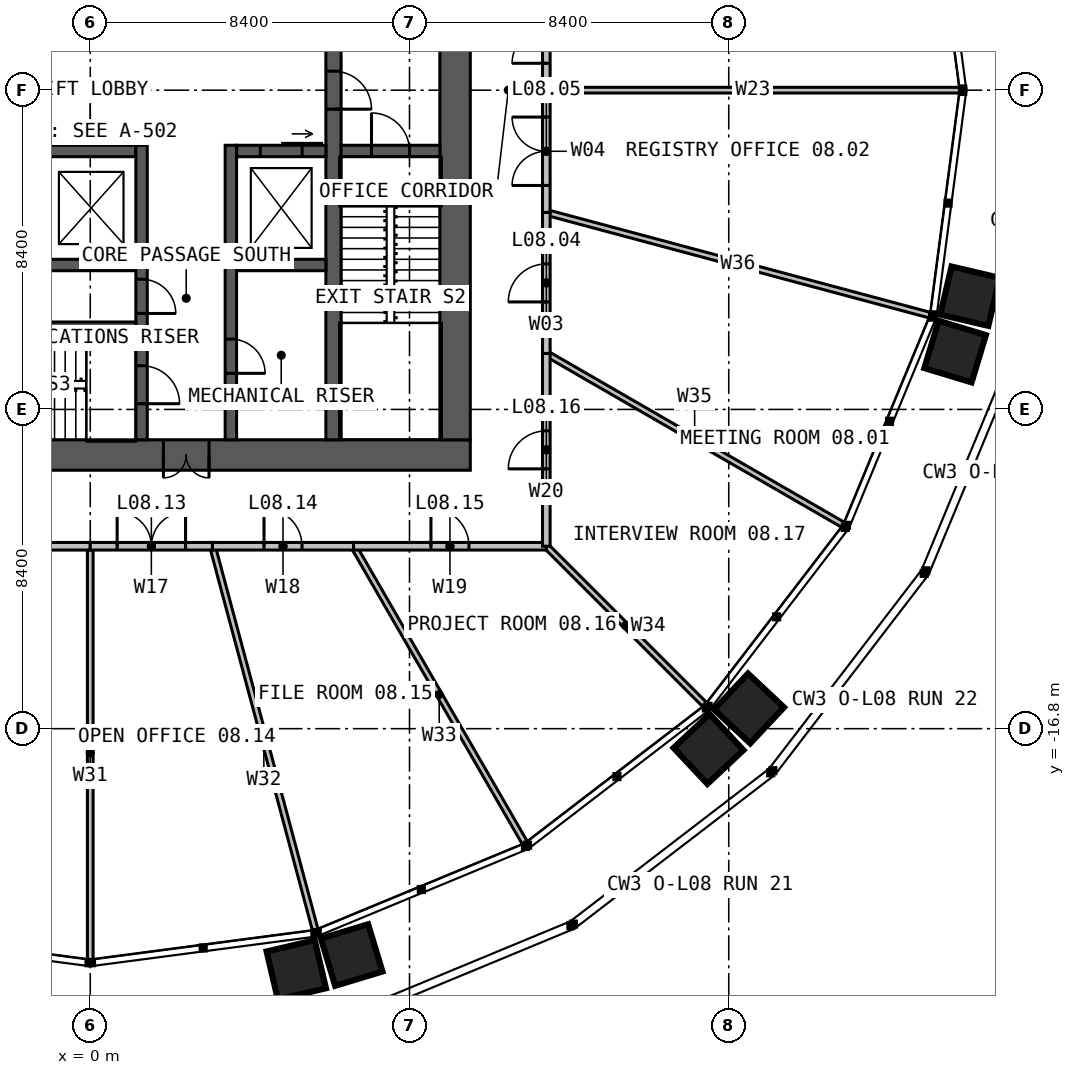
"""IFC4 building model, lengths in metres.
Left out: names, types, materials, properties, quantities, classifications, styles, units other than length and angle.
Written with IfcOpenShell. Run it as: python <this file> out.ifc"""

import sys

from ifc_helpers import new_model, si_unit, direction, frame, frame_2d, origin, place, context, subcontext, project, spatial, rectangle, extrude, element, fill, save


model = new_model("IFC4")
c1 = context("Model", 3, precision=1e-05, world=origin(), true_north=direction((0.0, 1.0)))
c2 = subcontext(c1, "Body", "Model", "MODEL_VIEW")
j1 = project(units=[si_unit("LENGTHUNIT", "METRE"), si_unit("PLANEANGLEUNIT", "RADIAN")], contexts=[c1])
p1 = place(None, origin())
s1 = spatial("IfcSite", under=j1, at=p1, CompositionType="ELEMENT")
p2 = place(p1, origin())
s2 = spatial("IfcBuilding", under=s1, at=p2, CompositionType="ELEMENT")
p3 = place(p2, frame((0.0, 0.0, 37.0)))
s3 = spatial("IfcBuildingStorey", under=s2, at=p3, CompositionType="ELEMENT", Elevation=37.0)
p4 = place(p3, frame((10.0, -9.6, 0.0), z_axis=(0.0, 0.0, 1.0), x_axis=(-1.0, 0.0, 0.0)))
e1 = element("IfcWall", 1, at=p4, inside=s3, PredefinedType="SOLIDWALL", context=c2, shape_type="SweptSolid", body=[
    extrude(rectangle(XDim=20.0, YDim=0.8, at=frame_2d((10.0, 0.0))), origin(), (0.0, 0.0, 1.0), 4.0),
])
p5 = place(p4, frame((6.875, 0.0, 0.0)))
e2 = element("IfcOpeningElement", 2, at=p5, cuts=e1, PredefinedType="OPENING", context=c2, shape_type="SweptSolid", body=[
    extrude(rectangle(XDim=1.2, YDim=2.2, at=frame_2d((0.6, 1.1))), frame((0.0, 0.41, 0.0), z_axis=(0.0, -1.0, 0.0), x_axis=(1.0, 0.0, 0.0)), (0.0, 0.0, 1.0), 0.82),
])
p6 = place(p3, frame((9.6, -9.2, 0.0), z_axis=(0.0, 0.0, 1.0), x_axis=(0.0, 1.0, 0.0)))
e3 = element("IfcWall", 3, at=p6, inside=s3, PredefinedType="SOLIDWALL", context=c2, shape_type="SweptSolid", body=[
    extrude(rectangle(XDim=18.4, YDim=0.8, at=frame_2d((9.2, 0.0))), origin(), (0.0, 0.0, 1.0), 4.0),
])
p7 = place(p3, frame((6.4, 9.2, 0.0), z_axis=(0.0, 0.0, 1.0), x_axis=(0.0, -1.0, 0.0)))
e4 = element("IfcWall", 4, at=p7, inside=s3, PredefinedType="SOLIDWALL", context=c2, shape_type="SweptSolid", body=[
    extrude(rectangle(XDim=18.4, YDim=0.4, at=frame_2d((9.2, 0.0))), origin(), (0.0, 0.0, 1.0), 4.0),
])
p8 = place(p7, frame((8.7, 0.0, 0.0)))
e5 = element("IfcOpeningElement", 5, at=p8, cuts=e4, PredefinedType="OPENING", context=c2, shape_type="SweptSolid", body=[
    extrude(rectangle(XDim=1.0, YDim=2.2, at=frame_2d((0.5, 1.1))), frame((0.0, 0.21, 0.0), z_axis=(0.0, -1.0, 0.0), x_axis=(1.0, 0.0, 0.0)), (0.0, 0.0, 1.0), 0.42),
])
p9 = place(p3, frame((-6.2, -1.6, 0.0), z_axis=(0.0, 0.0, 1.0), x_axis=(1.0, 0.0, 0.0)))
e6 = element("IfcWall", 6, at=p9, inside=s3, PredefinedType="SOLIDWALL", context=c2, shape_type="SweptSolid", body=[
    extrude(rectangle(XDim=7.4, YDim=0.3, at=frame_2d((3.7, 0.0))), origin(), (0.0, 0.0, 1.0), 4.0),
])
p10 = place(p3, frame((3.85, -1.6, 0.0), z_axis=(0.0, 0.0, 1.0), x_axis=(1.0, 0.0, 0.0)))
e7 = element("IfcWall", 7, at=p10, inside=s3, PredefinedType="SOLIDWALL", context=c2, shape_type="SweptSolid", body=[
    extrude(rectangle(XDim=2.35, YDim=0.3, at=frame_2d((1.175, 0.0))), origin(), (0.0, 0.0, 1.0), 4.0),
])
p11 = place(p10, frame((0.625, 0.0, 0.0)))
e8 = element("IfcOpeningElement", 8, at=p11, cuts=e7, PredefinedType="OPENING", context=c2, shape_type="SweptSolid", body=[
    extrude(rectangle(XDim=1.1, YDim=2.2, at=frame_2d((0.55, 1.1))), frame((0.0, 0.16, 0.0), z_axis=(0.0, -1.0, 0.0), x_axis=(1.0, 0.0, 0.0)), (0.0, 0.0, 1.0), 0.32),
])
p12 = place(p3, frame((-6.2, -4.6, 0.0), z_axis=(0.0, 0.0, 1.0), x_axis=(1.0, 0.0, 0.0)))
e9 = element("IfcWall", 9, at=p12, inside=s3, PredefinedType="SOLIDWALL", context=c2, shape_type="SweptSolid", body=[
    extrude(rectangle(XDim=7.4, YDim=0.3, at=frame_2d((3.7, 0.0))), origin(), (0.0, 0.0, 1.0), 4.0),
])
p13 = place(p3, frame((3.85, -4.6, 0.0), z_axis=(0.0, 0.0, 1.0), x_axis=(1.0, 0.0, 0.0)))
e10 = element("IfcWall", 10, at=p13, inside=s3, PredefinedType="SOLIDWALL", context=c2, shape_type="SweptSolid", body=[
    extrude(rectangle(XDim=2.35, YDim=0.3, at=frame_2d((1.175, 0.0))), origin(), (0.0, 0.0, 1.0), 4.0),
])
p14 = place(p3, frame((1.35, -1.45, 0.0), z_axis=(0.0, 0.0, 1.0), x_axis=(0.0, -1.0, 0.0)))
e11 = element("IfcWall", 11, at=p14, inside=s3, PredefinedType="SOLIDWALL", context=c2, shape_type="SweptSolid", body=[
    extrude(rectangle(XDim=7.75, YDim=0.3, at=frame_2d((3.875, 0.0))), origin(), (0.0, 0.0, 1.0), 4.0),
])
p15 = place(p14, frame((5.8, 0.0, 0.0)))
e12 = element("IfcOpeningElement", 12, at=p15, cuts=e11, PredefinedType="OPENING", context=c2, shape_type="SweptSolid", body=[
    extrude(rectangle(XDim=1.0, YDim=2.2, at=frame_2d((0.5, 1.1))), frame((0.0, 0.16, 0.0), z_axis=(0.0, -1.0, 0.0), x_axis=(1.0, 0.0, 0.0)), (0.0, 0.0, 1.0), 0.32),
])
p16 = place(p14, frame((3.525, 0.0, 0.0)))
e13 = element("IfcOpeningElement", 13, at=p16, cuts=e11, PredefinedType="OPENING", context=c2, shape_type="SweptSolid", body=[
    extrude(rectangle(XDim=0.9, YDim=2.2, at=frame_2d((0.45, 1.1))), frame((0.0, 0.16, 0.0), z_axis=(0.0, -1.0, 0.0), x_axis=(1.0, 0.0, 0.0)), (0.0, 0.0, 1.0), 0.32),
])
p17 = place(p3, frame((3.7, -1.45, 0.0), z_axis=(0.0, 0.0, 1.0), x_axis=(0.0, -1.0, 0.0)))
e14 = element("IfcWall", 14, at=p17, inside=s3, PredefinedType="SOLIDWALL", context=c2, shape_type="SweptSolid", body=[
    extrude(rectangle(XDim=7.75, YDim=0.3, at=frame_2d((3.875, 0.0))), origin(), (0.0, 0.0, 1.0), 4.0),
])
p18 = place(p17, frame((5.1, 0.0, 0.0)))
e15 = element("IfcOpeningElement", 15, at=p18, cuts=e14, PredefinedType="OPENING", context=c2, shape_type="SweptSolid", body=[
    extrude(rectangle(XDim=0.9, YDim=2.2, at=frame_2d((0.45, 1.1))), frame((0.0, 0.16, 0.0), z_axis=(0.0, -1.0, 0.0), x_axis=(1.0, 0.0, 0.0)), (0.0, 0.0, 1.0), 0.32),
])
p19 = place(p3, frame((-6.2, -6.2, 0.0), z_axis=(0.0, 0.0, 1.0), x_axis=(1.0, 0.0, 0.0)))
e16 = element("IfcWall", 16, at=p19, inside=s3, PredefinedType="SOLIDWALL", context=c2, shape_type="SweptSolid", body=[
    extrude(rectangle(XDim=7.4, YDim=0.2, at=frame_2d((3.7, 0.0))), origin(), (0.0, 0.0, 1.0), 4.0),
])
p20 = place(p3, frame((6.6, -1.6, 0.0), z_axis=(0.0, 0.0, 1.0), x_axis=(1.0, 0.0, 0.0)))
e17 = element("IfcWall", 17, at=p20, inside=s3, PredefinedType="SOLIDWALL", context=c2, shape_type="SweptSolid", body=[
    extrude(rectangle(XDim=2.6, YDim=0.3, at=frame_2d((1.3, 0.0))), origin(), (0.0, 0.0, 1.0), 4.0),
])
p21 = place(p20, frame((0.8, 0.0, 0.0)))
e18 = element("IfcOpeningElement", 18, at=p21, cuts=e17, PredefinedType="OPENING", context=c2, shape_type="SweptSolid", body=[
    extrude(rectangle(XDim=1.0, YDim=2.2, at=frame_2d((0.5, 1.1))), frame((0.0, 0.16, 0.0), z_axis=(0.0, -1.0, 0.0), x_axis=(1.0, 0.0, 0.0)), (0.0, 0.0, 1.0), 0.32),
])
p22 = place(p3, frame((12.0, -6.928, 0.0), z_axis=(0.0, 0.0, 1.0), x_axis=(0.866027720199, -0.49999598783, 0.0)))
e19 = element("IfcWall", 19, at=p22, inside=s3, PredefinedType="PARTITIONING", context=c2, shape_type="SweptSolid", body=[
    extrude(rectangle(XDim=9.014, YDim=0.15, at=frame_2d((4.507, 0.0))), origin(), (0.0, 0.0, 1.0), 2.79),
])
p23 = place(p3, frame((12.0, -3.215, 0.0), z_axis=(0.0, 0.0, 1.0), x_axis=(0.965925101944, -0.25882174838, 0.0)))
e20 = element("IfcWall", 20, at=p23, inside=s3, PredefinedType="PARTITIONING", context=c2, shape_type="SweptSolid", body=[
    extrude(rectangle(XDim=10.447, YDim=0.15, at=frame_2d((5.223, 0.0))), origin(), (0.0, 0.0, 1.0), 2.79),
])
for number, where, z_axis, x_axis in (
    (21, (12.0, 0.0, 0.0), (0.0, 0.0, 1.0), (1.0, 0.0, 0.0)),
    (22, (0.0, -12.0, 0.0), (0.0, 0.0, 1.0), (0.0, -1.0, 0.0)),
):
    element("IfcWall", number, at=place(p3, frame(where, z_axis=z_axis, x_axis=x_axis)), inside=s3, PredefinedType="PARTITIONING", context=c2, shape_type="SweptSolid", body=[
        extrude(rectangle(XDim=10.87, YDim=0.15, at=frame_2d((5.435, 0.0))), origin(), (0.0, 0.0, 1.0), 2.79),
    ])
p24 = place(p3, frame((3.215, -12.0, 0.0), z_axis=(0.0, 0.0, 1.0), x_axis=(0.25882174838, -0.965925101944, 0.0)))
e23 = element("IfcWall", 23, at=p24, inside=s3, PredefinedType="PARTITIONING", context=c2, shape_type="SweptSolid", body=[
    extrude(rectangle(XDim=10.447, YDim=0.15, at=frame_2d((5.223, 0.0))), origin(), (0.0, 0.0, 1.0), 2.79),
])
p25 = place(p3, frame((6.928, -12.0, 0.0), z_axis=(0.0, 0.0, 1.0), x_axis=(0.49999598783, -0.866027720199, 0.0)))
e24 = element("IfcWall", 24, at=p25, inside=s3, PredefinedType="PARTITIONING", context=c2, shape_type="SweptSolid", body=[
    extrude(rectangle(XDim=9.014, YDim=0.15, at=frame_2d((4.507, 0.0))), origin(), (0.0, 0.0, 1.0), 2.79),
])
p26 = place(p3, frame((12.0, -12.0, 0.0), z_axis=(0.0, 0.0, 1.0), x_axis=(0.707106781187, -0.707106781187, 0.0)))
e25 = element("IfcWall", 25, at=p26, inside=s3, PredefinedType="PARTITIONING", context=c2, shape_type="SweptSolid", body=[
    extrude(rectangle(XDim=5.9, YDim=0.15, at=frame_2d((2.95, 0.0))), origin(), (0.0, 0.0, 1.0), 2.79),
])
p27 = place(p3, frame((12.0, -6.928, 0.0), z_axis=(0.0, 0.0, 1.0), x_axis=(0.0, 1.0, 0.0)))
e26 = element("IfcWall", 26, at=p27, inside=s3, PredefinedType="PARTITIONING", context=c2, shape_type="SweptSolid", body=[
    extrude(rectangle(XDim=3.713, YDim=0.2, at=frame_2d((1.856, 0.0))), origin(), (0.0, 0.0, 1.0), 3.8),
])
p28 = place(p27, frame((1.356, 0.0, 0.0)))
e27 = element("IfcOpeningElement", 27, at=p28, cuts=e26, PredefinedType="OPENING", context=c2, shape_type="SweptSolid", body=[
    extrude(rectangle(XDim=1.0, YDim=2.2, at=frame_2d((0.5, 1.1))), frame((0.0, 0.11, 0.0), z_axis=(0.0, -1.0, 0.0), x_axis=(1.0, 0.0, 0.0)), (0.0, 0.0, 1.0), 0.22),
])
p29 = place(p3, frame((12.0, -3.215, 0.0), z_axis=(0.0, 0.0, 1.0), x_axis=(0.0, 1.0, 0.0)))
e28 = element("IfcWall", 28, at=p29, inside=s3, PredefinedType="PARTITIONING", context=c2, shape_type="SweptSolid", body=[
    extrude(rectangle(XDim=3.215, YDim=0.2, at=frame_2d((1.608, 0.0))), origin(), (0.0, 0.0, 1.0), 3.8),
])
p30 = place(p29, frame((0.708, 0.0, 0.0)))
e29 = element("IfcOpeningElement", 29, at=p30, cuts=e28, PredefinedType="OPENING", context=c2, shape_type="SweptSolid", body=[
    extrude(rectangle(XDim=1.8, YDim=2.2, at=frame_2d((0.9, 1.1))), frame((0.0, 0.11, 0.0), z_axis=(0.0, -1.0, 0.0), x_axis=(1.0, 0.0, 0.0)), (0.0, 0.0, 1.0), 0.22),
])
p31 = place(p3, frame((12.0, 0.0, 0.0), z_axis=(0.0, 0.0, 1.0), x_axis=(0.0, 1.0, 0.0)))
e30 = element("IfcWall", 30, at=p31, inside=s3, PredefinedType="PARTITIONING", context=c2, shape_type="SweptSolid", body=[
    extrude(rectangle(XDim=3.215, YDim=0.2, at=frame_2d((1.608, 0.0))), origin(), (0.0, 0.0, 1.0), 3.8),
])
p32 = place(p31, frame((0.708, 0.0, 0.0)))
e31 = element("IfcOpeningElement", 31, at=p32, cuts=e30, PredefinedType="OPENING", context=c2, shape_type="SweptSolid", body=[
    extrude(rectangle(XDim=1.8, YDim=2.2, at=frame_2d((0.9, 1.1))), frame((0.0, 0.11, 0.0), z_axis=(0.0, -1.0, 0.0), x_axis=(1.0, 0.0, 0.0)), (0.0, 0.0, 1.0), 0.22),
])
p33 = place(p3, frame((-6.928, -12.0, 0.0), z_axis=(0.0, 0.0, 1.0), x_axis=(1.0, 0.0, 0.0)))
e32 = element("IfcWall", 32, at=p33, inside=s3, PredefinedType="PARTITIONING", context=c2, shape_type="SweptSolid", body=[
    extrude(rectangle(XDim=6.928, YDim=0.2, at=frame_2d((3.464, 0.0))), origin(), (0.0, 0.0, 1.0), 3.8),
])
p34 = place(p33, frame((2.564, 0.0, 0.0)))
e33 = element("IfcOpeningElement", 33, at=p34, cuts=e32, PredefinedType="OPENING", context=c2, shape_type="SweptSolid", body=[
    extrude(rectangle(XDim=1.8, YDim=2.2, at=frame_2d((0.9, 1.1))), frame((0.0, 0.11, 0.0), z_axis=(0.0, -1.0, 0.0), x_axis=(1.0, 0.0, 0.0)), (0.0, 0.0, 1.0), 0.22),
])
p35 = place(p3, frame((0.0, -12.0, 0.0), z_axis=(0.0, 0.0, 1.0), x_axis=(1.0, 0.0, 0.0)))
e34 = element("IfcWall", 34, at=p35, inside=s3, PredefinedType="PARTITIONING", context=c2, shape_type="SweptSolid", body=[
    extrude(rectangle(XDim=3.215, YDim=0.2, at=frame_2d((1.608, 0.0))), origin(), (0.0, 0.0, 1.0), 3.8),
])
p36 = place(p35, frame((0.708, 0.0, 0.0)))
e35 = element("IfcOpeningElement", 35, at=p36, cuts=e34, PredefinedType="OPENING", context=c2, shape_type="SweptSolid", body=[
    extrude(rectangle(XDim=1.8, YDim=2.2, at=frame_2d((0.9, 1.1))), frame((0.0, 0.11, 0.0), z_axis=(0.0, -1.0, 0.0), x_axis=(1.0, 0.0, 0.0)), (0.0, 0.0, 1.0), 0.22),
])
p37 = place(p3, frame((3.215, -12.0, 0.0), z_axis=(0.0, 0.0, 1.0), x_axis=(1.0, 0.0, 0.0)))
e36 = element("IfcWall", 36, at=p37, inside=s3, PredefinedType="PARTITIONING", context=c2, shape_type="SweptSolid", body=[
    extrude(rectangle(XDim=3.713, YDim=0.2, at=frame_2d((1.856, 0.0))), origin(), (0.0, 0.0, 1.0), 3.8),
])
p38 = place(p37, frame((1.356, 0.0, 0.0)))
e37 = element("IfcOpeningElement", 37, at=p38, cuts=e36, PredefinedType="OPENING", context=c2, shape_type="SweptSolid", body=[
    extrude(rectangle(XDim=1.0, YDim=2.2, at=frame_2d((0.5, 1.1))), frame((0.0, 0.11, 0.0), z_axis=(0.0, -1.0, 0.0), x_axis=(1.0, 0.0, 0.0)), (0.0, 0.0, 1.0), 0.22),
])
p39 = place(p3, frame((6.928, -12.0, 0.0), z_axis=(0.0, 0.0, 1.0), x_axis=(1.0, 0.0, 0.0)))
e38 = element("IfcWall", 38, at=p39, inside=s3, PredefinedType="PARTITIONING", context=c2, shape_type="SweptSolid", body=[
    extrude(rectangle(XDim=5.072, YDim=0.2, at=frame_2d((2.536, 0.0))), origin(), (0.0, 0.0, 1.0), 3.8),
])
p40 = place(p39, frame((2.036, 0.0, 0.0)))
e39 = element("IfcOpeningElement", 39, at=p40, cuts=e38, PredefinedType="OPENING", context=c2, shape_type="SweptSolid", body=[
    extrude(rectangle(XDim=1.0, YDim=2.2, at=frame_2d((0.5, 1.1))), frame((0.0, 0.11, 0.0), z_axis=(0.0, -1.0, 0.0), x_axis=(1.0, 0.0, 0.0)), (0.0, 0.0, 1.0), 0.22),
])
p41 = place(p3, frame((12.0, -12.0, 0.0), z_axis=(0.0, 0.0, 1.0), x_axis=(0.0, 1.0, 0.0)))
e40 = element("IfcWall", 40, at=p41, inside=s3, PredefinedType="PARTITIONING", context=c2, shape_type="SweptSolid", body=[
    extrude(rectangle(XDim=5.072, YDim=0.2, at=frame_2d((2.536, 0.0))), origin(), (0.0, 0.0, 1.0), 3.8),
])
p42 = place(p41, frame((2.036, 0.0, 0.0)))
e41 = element("IfcOpeningElement", 41, at=p42, cuts=e40, PredefinedType="OPENING", context=c2, shape_type="SweptSolid", body=[
    extrude(rectangle(XDim=1.0, YDim=2.2, at=frame_2d((0.5, 1.1))), frame((0.0, 0.11, 0.0), z_axis=(0.0, -1.0, 0.0), x_axis=(1.0, 0.0, 0.0)), (0.0, 0.0, 1.0), 0.22),
])
p43 = place(p5, origin())
e42 = element("IfcDoor", 42, at=p43, inside=s3, OperationType="DOUBLE_DOOR_SINGLE_SWING", PredefinedType="DOOR", context=c2, shape_type="SweptSolid", body=[
    extrude(rectangle(XDim=1.2, YDim=2.2, at=frame_2d((0.6, 1.1))), frame((0.0, 0.025, 0.0), z_axis=(0.0, -1.0, 0.0), x_axis=(1.0, 0.0, 0.0)), (0.0, 0.0, 1.0), 0.05),
])
fill(e2, e42)
p44 = place(p8, origin())
e43 = element("IfcDoor", 43, at=p44, inside=s3, OperationType="SINGLE_SWING_RIGHT", PredefinedType="DOOR", context=c2, shape_type="SweptSolid", body=[
    extrude(rectangle(XDim=1.0, YDim=2.2, at=frame_2d((0.5, 1.1))), frame((0.0, 0.025, 0.0), z_axis=(0.0, -1.0, 0.0), x_axis=(1.0, 0.0, 0.0)), (0.0, 0.0, 1.0), 0.05),
])
fill(e5, e43)
p45 = place(p21, origin())
e44 = element("IfcDoor", 44, at=p45, inside=s3, OperationType="SINGLE_SWING_LEFT", PredefinedType="DOOR", context=c2, shape_type="SweptSolid", body=[
    extrude(rectangle(XDim=1.0, YDim=2.2, at=frame_2d((0.5, 1.1))), frame((0.0, 0.025, 0.0), z_axis=(0.0, -1.0, 0.0), x_axis=(1.0, 0.0, 0.0)), (0.0, 0.0, 1.0), 0.05),
])
fill(e18, e44)
p46 = place(p15, origin())
e45 = element("IfcDoor", 45, at=p46, inside=s3, OperationType="SINGLE_SWING_RIGHT", PredefinedType="DOOR", context=c2, shape_type="SweptSolid", body=[
    extrude(rectangle(XDim=1.0, YDim=2.2, at=frame_2d((0.5, 1.1))), frame((0.0, 0.025, 0.0), z_axis=(0.0, -1.0, 0.0), x_axis=(1.0, 0.0, 0.0)), (0.0, 0.0, 1.0), 0.05),
])
fill(e12, e45)
p47 = place(p16, origin())
e46 = element("IfcDoor", 46, at=p47, inside=s3, OperationType="SINGLE_SWING_RIGHT", PredefinedType="DOOR", context=c2, shape_type="SweptSolid", body=[
    extrude(rectangle(XDim=0.9, YDim=2.2, at=frame_2d((0.45, 1.1))), frame((0.0, 0.025, 0.0), z_axis=(0.0, -1.0, 0.0), x_axis=(1.0, 0.0, 0.0)), (0.0, 0.0, 1.0), 0.05),
])
fill(e13, e46)
p48 = place(p18, origin())
e47 = element("IfcDoor", 47, at=p48, inside=s3, OperationType="SINGLE_SWING_RIGHT", PredefinedType="DOOR", context=c2, shape_type="SweptSolid", body=[
    extrude(rectangle(XDim=0.9, YDim=2.2, at=frame_2d((0.45, 1.1))), frame((0.0, 0.025, 0.0), z_axis=(0.0, -1.0, 0.0), x_axis=(1.0, 0.0, 0.0)), (0.0, 0.0, 1.0), 0.05),
])
fill(e15, e47)
p49 = place(p11, origin())
e48 = element("IfcDoor", 48, at=p49, inside=s3, OperationType="SLIDING_TO_LEFT", PredefinedType="DOOR", context=c2, shape_type="SweptSolid", body=[
    extrude(rectangle(XDim=1.1, YDim=2.2, at=frame_2d((0.55, 1.1))), frame((0.0, 0.025, 0.0), z_axis=(0.0, -1.0, 0.0), x_axis=(1.0, 0.0, 0.0)), (0.0, 0.0, 1.0), 0.05),
])
fill(e8, e48)
p50 = place(p28, origin())
e49 = element("IfcDoor", 49, at=p50, inside=s3, OperationType="SINGLE_SWING_LEFT", PredefinedType="DOOR", context=c2, shape_type="SweptSolid", body=[
    extrude(rectangle(XDim=1.0, YDim=2.2, at=frame_2d((0.5, 1.1))), frame((0.0, 0.025, 0.0), z_axis=(0.0, -1.0, 0.0), x_axis=(1.0, 0.0, 0.0)), (0.0, 0.0, 1.0), 0.05),
])
fill(e27, e49)
p51 = place(p30, origin())
e50 = element("IfcDoor", 50, at=p51, inside=s3, OperationType="DOUBLE_DOOR_SINGLE_SWING", PredefinedType="DOOR", context=c2, shape_type="SweptSolid", body=[
    extrude(rectangle(XDim=1.8, YDim=2.2, at=frame_2d((0.9, 1.1))), frame((0.0, 0.025, 0.0), z_axis=(0.0, -1.0, 0.0), x_axis=(1.0, 0.0, 0.0)), (0.0, 0.0, 1.0), 0.05),
])
fill(e29, e50)
p52 = place(p32, origin())
e51 = element("IfcDoor", 51, at=p52, inside=s3, OperationType="DOUBLE_DOOR_SINGLE_SWING", PredefinedType="DOOR", context=c2, shape_type="SweptSolid", body=[
    extrude(rectangle(XDim=1.8, YDim=2.2, at=frame_2d((0.9, 1.1))), frame((0.0, 0.025, 0.0), z_axis=(0.0, -1.0, 0.0), x_axis=(1.0, 0.0, 0.0)), (0.0, 0.0, 1.0), 0.05),
])
fill(e31, e51)
p53 = place(p36, origin())
e52 = element("IfcDoor", 52, at=p53, inside=s3, OperationType="DOUBLE_DOOR_SINGLE_SWING", PredefinedType="DOOR", context=c2, shape_type="SweptSolid", body=[
    extrude(rectangle(XDim=1.8, YDim=2.2, at=frame_2d((0.9, 1.1))), frame((0.0, 0.025, 0.0), z_axis=(0.0, -1.0, 0.0), x_axis=(1.0, 0.0, 0.0)), (0.0, 0.0, 1.0), 0.05),
])
fill(e35, e52)
p54 = place(p38, origin())
e53 = element("IfcDoor", 53, at=p54, inside=s3, OperationType="SINGLE_SWING_LEFT", PredefinedType="DOOR", context=c2, shape_type="SweptSolid", body=[
    extrude(rectangle(XDim=1.0, YDim=2.2, at=frame_2d((0.5, 1.1))), frame((0.0, 0.025, 0.0), z_axis=(0.0, -1.0, 0.0), x_axis=(1.0, 0.0, 0.0)), (0.0, 0.0, 1.0), 0.05),
])
fill(e37, e53)
p55 = place(p40, origin())
e54 = element("IfcDoor", 54, at=p55, inside=s3, OperationType="SINGLE_SWING_LEFT", PredefinedType="DOOR", context=c2, shape_type="SweptSolid", body=[
    extrude(rectangle(XDim=1.0, YDim=2.2, at=frame_2d((0.5, 1.1))), frame((0.0, 0.025, 0.0), z_axis=(0.0, -1.0, 0.0), x_axis=(1.0, 0.0, 0.0)), (0.0, 0.0, 1.0), 0.05),
])
fill(e39, e54)
p56 = place(p42, origin())
e55 = element("IfcDoor", 55, at=p56, inside=s3, OperationType="SINGLE_SWING_LEFT", PredefinedType="DOOR", context=c2, shape_type="SweptSolid", body=[
    extrude(rectangle(XDim=1.0, YDim=2.2, at=frame_2d((0.5, 1.1))), frame((0.0, 0.025, 0.0), z_axis=(0.0, -1.0, 0.0), x_axis=(1.0, 0.0, 0.0)), (0.0, 0.0, 1.0), 0.05),
])
fill(e41, e55)
save(model, sys.argv[1])
